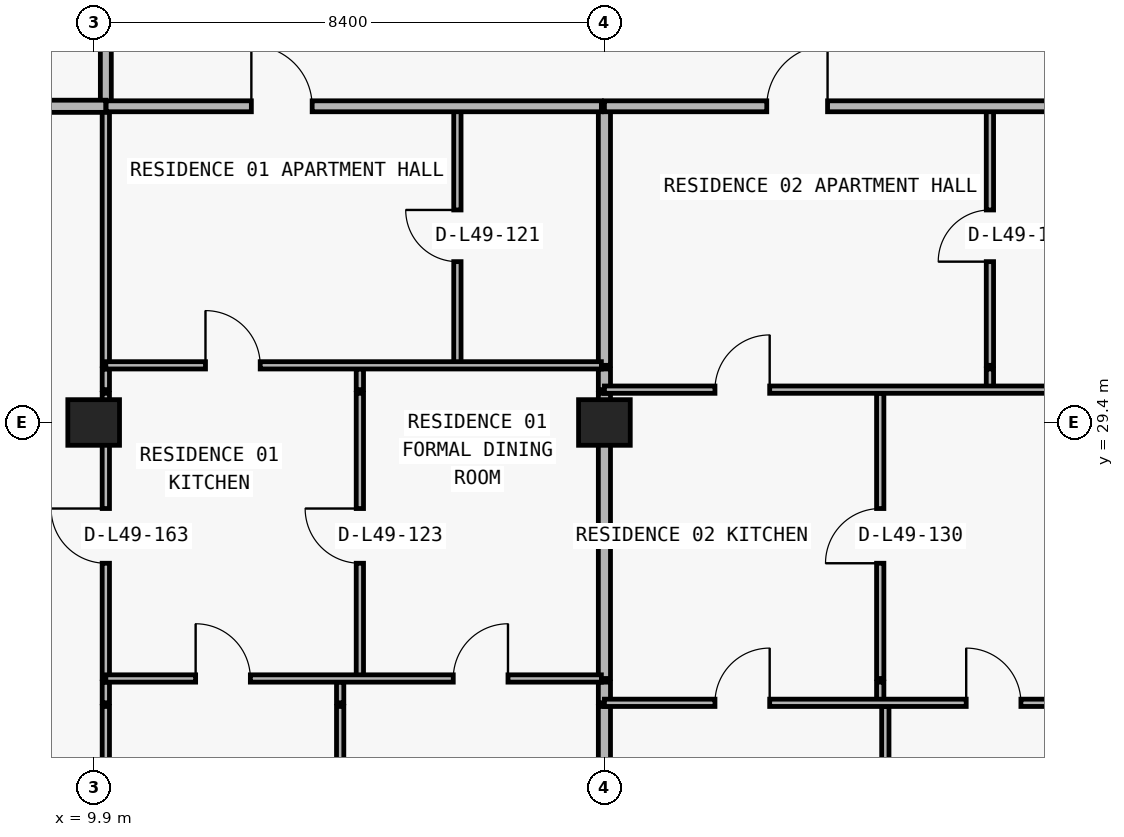
"""IFC4 building model, lengths in metres.
Left out: names, types, materials, properties, quantities, classifications, styles, units other than length and angle.
Written with IfcOpenShell. Run it as: python <this file> out.ifc"""

import sys

from ifc_helpers import new_model, si_unit, direction, frame, frame_2d, origin, origin_2d, place, context, subcontext, project, spatial, rectangle, extrude, element, fill, save


model = new_model("IFC4")
c1 = context("Model", 3, precision=1e-05, world=origin(), true_north=direction((0.0, 1.0)))
c2 = subcontext(c1, "Body", "Model", "MODEL_VIEW")
j1 = project(units=[si_unit("LENGTHUNIT", "METRE"), si_unit("PLANEANGLEUNIT", "RADIAN")], contexts=[c1])
p1 = place(None, origin())
s1 = spatial("IfcSite", under=j1, at=p1, CompositionType="ELEMENT")
p2 = place(p1, origin())
s2 = spatial("IfcBuilding", under=s1, at=p2, CompositionType="ELEMENT")
p3 = place(p2, frame((0.0, 0.0, 177.0)))
s3 = spatial("IfcBuildingStorey", under=s2, at=p3, CompositionType="ELEMENT", Elevation=177.0)
for number, where, z_axis, x_axis in (
    (1, (9.9, 29.4, 0.0), (0.0, 0.0, 1.0), (1.0, 0.0, 0.0)),
    (2, (18.3, 29.4, 0.0), (0.0, 0.0, 1.0), (1.0, 0.0, 0.0)),
):
    element("IfcColumn", number, at=place(p3, frame(where, z_axis=z_axis, x_axis=x_axis)), inside=s3, PredefinedType="COLUMN", context=c2, shape_type="SweptSolid", body=[
        extrude(rectangle(XDim=0.85, YDim=0.75, at=origin_2d()), origin(), (0.0, 0.0, 1.0), 3.05),
    ])
p4 = place(p3, frame((10.1, 11.285, 0.0), z_axis=(0.0, 0.0, 1.0), x_axis=(0.0, 1.0, 0.0)))
e3 = element("IfcWall", 3, at=p4, inside=s3, PredefinedType="PARTITIONING", context=c2, shape_type="SweptSolid", body=[
    extrude(rectangle(XDim=13.445, YDim=0.12, at=frame_2d((6.723, 0.0))), origin(), (0.0, 0.0, 1.0), 2.263),
])
p5 = place(p3, frame((10.1, 24.79, 0.0), z_axis=(0.0, 0.0, 1.0), x_axis=(0.0, 1.0, 0.0)))
e4 = element("IfcWall", 4, at=p5, inside=s3, PredefinedType="PARTITIONING", context=c2, shape_type="SweptSolid", body=[
    extrude(rectangle(XDim=0.34, YDim=0.12, at=frame_2d((0.17, 0.0))), origin(), (0.0, 0.0, 1.0), 2.263),
])
p6 = place(p3, frame((10.1, 25.19, 0.0), z_axis=(0.0, 0.0, 1.0), x_axis=(0.0, 1.0, 0.0)))
e5 = element("IfcWall", 5, at=p6, inside=s3, PredefinedType="PARTITIONING", context=c2, shape_type="SweptSolid", body=[
    extrude(rectangle(XDim=4.69, YDim=0.12, at=frame_2d((2.345, 0.0))), origin(), (0.0, 0.0, 1.0), 2.263),
])
p7 = place(p6, frame((1.895, 0.0, 0.0)))
e6 = element("IfcOpeningElement", 6, at=p7, cuts=e5, PredefinedType="OPENING", context=c2, shape_type="SweptSolid", body=[
    extrude(rectangle(XDim=0.9, YDim=2.15, at=frame_2d((0.45, 1.075))), frame((0.0, 0.07, 0.0), z_axis=(0.0, -1.0, 0.0), x_axis=(1.0, 0.0, 0.0)), (0.0, 0.0, 1.0), 0.14),
])
p8 = place(p3, frame((10.1, 29.94, 0.0), z_axis=(0.0, 0.0, 1.0), x_axis=(0.0, 1.0, 0.0)))
e7 = element("IfcWall", 7, at=p8, inside=s3, PredefinedType="PARTITIONING", context=c2, shape_type="SweptSolid", body=[
    extrude(rectangle(XDim=0.34, YDim=0.12, at=frame_2d((0.17, 0.0))), origin(), (0.0, 0.0, 1.0), 2.263),
])
p9 = place(p3, frame((10.1, 30.34, 0.0), z_axis=(0.0, 0.0, 1.0), x_axis=(0.0, 1.0, 0.0)))
e8 = element("IfcWall", 8, at=p9, inside=s3, PredefinedType="PARTITIONING", context=c2, shape_type="SweptSolid", body=[
    extrude(rectangle(XDim=4.26, YDim=0.12, at=frame_2d((2.13, 0.0))), origin(), (0.0, 0.0, 1.0), 2.263),
])
p10 = place(p3, frame((10.1, 34.605, 0.0), z_axis=(0.0, 0.0, 1.0), x_axis=(0.0, 1.0, 0.0)))
e9 = element("IfcWall", 9, at=p10, inside=s3, PredefinedType="PARTITIONING", context=c2, shape_type="SweptSolid", body=[
    extrude(rectangle(XDim=2.345, YDim=0.18, at=frame_2d((1.172, 0.0))), origin(), (0.0, 0.0, 1.0), 2.263),
])
p11 = place(p3, frame((13.954, 11.24, 0.0), z_axis=(0.0, 0.0, 1.0), x_axis=(0.0, 1.0, 0.0)))
e10 = element("IfcWall", 10, at=p11, inside=s3, PredefinedType="PARTITIONING", context=c2, shape_type="SweptSolid", body=[
    extrude(rectangle(XDim=13.49, YDim=0.12, at=frame_2d((6.745, 0.0))), origin(), (0.0, 0.0, 1.0), 2.499),
])
p12 = place(p3, frame((13.954, 24.79, 0.0), z_axis=(0.0, 0.0, 1.0), x_axis=(0.0, 1.0, 0.0)))
e11 = element("IfcWall", 11, at=p12, inside=s3, PredefinedType="PARTITIONING", context=c2, shape_type="SweptSolid", body=[
    extrude(rectangle(XDim=0.34, YDim=0.12, at=frame_2d((0.17, 0.0))), origin(), (0.0, 0.0, 1.0), 2.499),
])
p13 = place(p3, frame((14.278, 25.19, 0.0), z_axis=(0.0, 0.0, 1.0), x_axis=(0.0, 1.0, 0.0)))
e12 = element("IfcWall", 12, at=p13, inside=s3, PredefinedType="PARTITIONING", context=c2, shape_type="SweptSolid", body=[
    extrude(rectangle(XDim=4.69, YDim=0.12, at=frame_2d((2.345, 0.0))), origin(), (0.0, 0.0, 1.0), 2.499),
])
p14 = place(p13, frame((1.895, 0.0, 0.0)))
e13 = element("IfcOpeningElement", 13, at=p14, cuts=e12, PredefinedType="OPENING", context=c2, shape_type="SweptSolid", body=[
    extrude(rectangle(XDim=0.9, YDim=2.15, at=frame_2d((0.45, 1.075))), frame((0.0, 0.07, 0.0), z_axis=(0.0, -1.0, 0.0), x_axis=(1.0, 0.0, 0.0)), (0.0, 0.0, 1.0), 0.14),
])
p15 = place(p3, frame((14.278, 29.94, 0.0), z_axis=(0.0, 0.0, 1.0), x_axis=(0.0, 1.0, 0.0)))
e14 = element("IfcWall", 14, at=p15, inside=s3, PredefinedType="PARTITIONING", context=c2, shape_type="SweptSolid", body=[
    extrude(rectangle(XDim=0.34, YDim=0.12, at=frame_2d((0.17, 0.0))), origin(), (0.0, 0.0, 1.0), 2.499),
])
p16 = place(p3, frame((15.882, 30.34, 0.0), z_axis=(0.0, 0.0, 1.0), x_axis=(0.0, 1.0, 0.0)))
e15 = element("IfcWall", 15, at=p16, inside=s3, PredefinedType="PARTITIONING", context=c2, shape_type="SweptSolid", body=[
    extrude(rectangle(XDim=4.26, YDim=0.12, at=frame_2d((2.13, 0.0))), origin(), (0.0, 0.0, 1.0), 3.05),
])
p17 = place(p16, frame((1.705, 0.0, 0.0)))
e16 = element("IfcOpeningElement", 16, at=p17, cuts=e15, PredefinedType="OPENING", context=c2, shape_type="SweptSolid", body=[
    extrude(rectangle(XDim=0.85, YDim=2.1, at=frame_2d((0.425, 1.05))), frame((0.0, 0.07, 0.0), z_axis=(0.0, -1.0, 0.0), x_axis=(1.0, 0.0, 0.0)), (0.0, 0.0, 1.0), 0.14),
])
p18 = place(p3, frame((18.3, 11.24, 0.0), z_axis=(0.0, 0.0, 1.0), x_axis=(0.0, 1.0, 0.0)))
e17 = element("IfcWall", 17, at=p18, inside=s3, PredefinedType="PARTITIONING", context=c2, shape_type="SweptSolid", body=[
    extrude(rectangle(XDim=13.49, YDim=0.2, at=frame_2d((6.745, 0.0))), origin(), (0.0, 0.0, 1.0), 2.263),
])
p19 = place(p3, frame((18.3, 24.79, 0.0), z_axis=(0.0, 0.0, 1.0), x_axis=(0.0, 1.0, 0.0)))
e18 = element("IfcWall", 18, at=p19, inside=s3, PredefinedType="PARTITIONING", context=c2, shape_type="SweptSolid", body=[
    extrude(rectangle(XDim=0.34, YDim=0.2, at=frame_2d((0.17, 0.0))), origin(), (0.0, 0.0, 1.0), 2.263),
])
p20 = place(p3, frame((18.3, 25.19, 0.0), z_axis=(0.0, 0.0, 1.0), x_axis=(0.0, 1.0, 0.0)))
e19 = element("IfcWall", 19, at=p20, inside=s3, PredefinedType="PARTITIONING", context=c2, shape_type="SweptSolid", body=[
    extrude(rectangle(XDim=4.69, YDim=0.2, at=frame_2d((2.345, 0.0))), origin(), (0.0, 0.0, 1.0), 2.263),
])
p21 = place(p3, frame((18.3, 29.94, 0.0), z_axis=(0.0, 0.0, 1.0), x_axis=(0.0, 1.0, 0.0)))
e20 = element("IfcWall", 20, at=p21, inside=s3, PredefinedType="PARTITIONING", context=c2, shape_type="SweptSolid", body=[
    extrude(rectangle(XDim=0.34, YDim=0.2, at=frame_2d((0.17, 0.0))), origin(), (0.0, 0.0, 1.0), 2.263),
])
p22 = place(p3, frame((18.3, 30.34, 0.0), z_axis=(0.0, 0.0, 1.0), x_axis=(0.0, 1.0, 0.0)))
e21 = element("IfcWall", 21, at=p22, inside=s3, PredefinedType="PARTITIONING", context=c2, shape_type="SweptSolid", body=[
    extrude(rectangle(XDim=4.26, YDim=0.2, at=frame_2d((2.13, 0.0))), origin(), (0.0, 0.0, 1.0), 2.263),
])
p23 = place(p3, frame((22.836, 24.79, 0.0), z_axis=(0.0, 0.0, 1.0), x_axis=(0.0, 1.0, 0.0)))
e22 = element("IfcWall", 22, at=p23, inside=s3, PredefinedType="PARTITIONING", context=c2, shape_type="SweptSolid", body=[
    extrude(rectangle(XDim=0.34, YDim=0.12, at=frame_2d((0.17, 0.0))), origin(), (0.0, 0.0, 1.0), 3.05),
])
p24 = place(p3, frame((22.836, 25.19, 0.0), z_axis=(0.0, 0.0, 1.0), x_axis=(0.0, 1.0, 0.0)))
e23 = element("IfcWall", 23, at=p24, inside=s3, PredefinedType="PARTITIONING", context=c2, shape_type="SweptSolid", body=[
    extrude(rectangle(XDim=4.69, YDim=0.12, at=frame_2d((2.345, 0.0))), origin(), (0.0, 0.0, 1.0), 3.05),
])
p25 = place(p24, frame((1.895, 0.0, 0.0)))
e24 = element("IfcOpeningElement", 24, at=p25, cuts=e23, PredefinedType="OPENING", context=c2, shape_type="SweptSolid", body=[
    extrude(rectangle(XDim=0.9, YDim=2.15, at=frame_2d((0.45, 1.075))), frame((0.0, 0.07, 0.0), z_axis=(0.0, -1.0, 0.0), x_axis=(1.0, 0.0, 0.0)), (0.0, 0.0, 1.0), 0.14),
])
p26 = place(p3, frame((22.92, 11.24, 0.0), z_axis=(0.0, 0.0, 1.0), x_axis=(0.0, 1.0, 0.0)))
e25 = element("IfcWall", 25, at=p26, inside=s3, PredefinedType="PARTITIONING", context=c2, shape_type="SweptSolid", body=[
    extrude(rectangle(XDim=13.49, YDim=0.12, at=frame_2d((6.745, 0.0))), origin(), (0.0, 0.0, 1.0), 3.05),
])
p27 = place(p3, frame((24.64, 29.94, 0.0), z_axis=(0.0, 0.0, 1.0), x_axis=(0.0, 1.0, 0.0)))
e26 = element("IfcWall", 26, at=p27, inside=s3, PredefinedType="PARTITIONING", context=c2, shape_type="SweptSolid", body=[
    extrude(rectangle(XDim=0.34, YDim=0.12, at=frame_2d((0.17, 0.0))), origin(), (0.0, 0.0, 1.0), 3.05),
])
p28 = place(p3, frame((24.64, 30.34, 0.0), z_axis=(0.0, 0.0, 1.0), x_axis=(0.0, 1.0, 0.0)))
e27 = element("IfcWall", 27, at=p28, inside=s3, PredefinedType="PARTITIONING", context=c2, shape_type="SweptSolid", body=[
    extrude(rectangle(XDim=4.26, YDim=0.12, at=frame_2d((2.13, 0.0))), origin(), (0.0, 0.0, 1.0), 3.05),
])
p29 = place(p28, frame((1.705, 0.0, 0.0)))
e28 = element("IfcOpeningElement", 28, at=p29, cuts=e27, PredefinedType="OPENING", context=c2, shape_type="SweptSolid", body=[
    extrude(rectangle(XDim=0.85, YDim=2.1, at=frame_2d((0.425, 1.05))), frame((0.0, 0.07, 0.0), z_axis=(0.0, -1.0, 0.0), x_axis=(1.0, 0.0, 0.0)), (0.0, 0.0, 1.0), 0.14),
])
p30 = place(p3, frame((18.3, 24.79, 0.0), z_axis=(0.0, 0.0, 1.0), x_axis=(1.0, 0.0, 0.0)))
e29 = element("IfcWall", 29, at=p30, inside=s3, PredefinedType="PARTITIONING", context=c2, shape_type="SweptSolid", body=[
    extrude(rectangle(XDim=8.18, YDim=0.12, at=frame_2d((4.09, 0.0))), origin(), (0.0, 0.0, 1.0), 3.05),
])
p31 = place(p30, frame((1.818, 0.0, 0.0)))
e30 = element("IfcOpeningElement", 30, at=p31, cuts=e29, PredefinedType="OPENING", context=c2, shape_type="SweptSolid", body=[
    extrude(rectangle(XDim=0.9, YDim=2.15, at=frame_2d((0.45, 1.075))), frame((0.0, 0.07, 0.0), z_axis=(0.0, -1.0, 0.0), x_axis=(1.0, 0.0, 0.0)), (0.0, 0.0, 1.0), 0.14),
])
p32 = place(p30, frame((5.95, 0.0, 0.0)))
e31 = element("IfcOpeningElement", 31, at=p32, cuts=e29, PredefinedType="OPENING", context=c2, shape_type="SweptSolid", body=[
    extrude(rectangle(XDim=0.9, YDim=2.15, at=frame_2d((0.45, 1.075))), frame((0.0, 0.07, 0.0), z_axis=(0.0, -1.0, 0.0), x_axis=(1.0, 0.0, 0.0)), (0.0, 0.0, 1.0), 0.14),
])
p33 = place(p3, frame((10.1, 25.19, 0.0), z_axis=(0.0, 0.0, 1.0), x_axis=(1.0, 0.0, 0.0)))
e32 = element("IfcWall", 32, at=p33, inside=s3, PredefinedType="PARTITIONING", context=c2, shape_type="SweptSolid", body=[
    extrude(rectangle(XDim=8.15, YDim=0.12, at=frame_2d((4.075, 0.0))), origin(), (0.0, 0.0, 1.0), 3.05),
])
p34 = place(p33, frame((1.477, 0.0, 0.0)))
e33 = element("IfcOpeningElement", 33, at=p34, cuts=e32, PredefinedType="OPENING", context=c2, shape_type="SweptSolid", body=[
    extrude(rectangle(XDim=0.9, YDim=2.15, at=frame_2d((0.45, 1.075))), frame((0.0, 0.07, 0.0), z_axis=(0.0, -1.0, 0.0), x_axis=(1.0, 0.0, 0.0)), (0.0, 0.0, 1.0), 0.14),
])
p35 = place(p33, frame((5.714, 0.0, 0.0)))
e34 = element("IfcOpeningElement", 34, at=p35, cuts=e32, PredefinedType="OPENING", context=c2, shape_type="SweptSolid", body=[
    extrude(rectangle(XDim=0.9, YDim=2.15, at=frame_2d((0.45, 1.075))), frame((0.0, 0.07, 0.0), z_axis=(0.0, -1.0, 0.0), x_axis=(1.0, 0.0, 0.0)), (0.0, 0.0, 1.0), 0.14),
])
p36 = place(p3, frame((18.3, 29.94, 0.0), z_axis=(0.0, 0.0, 1.0), x_axis=(1.0, 0.0, 0.0)))
e35 = element("IfcWall", 35, at=p36, inside=s3, PredefinedType="PARTITIONING", context=c2, shape_type="SweptSolid", body=[
    extrude(rectangle(XDim=8.4, YDim=0.12, at=frame_2d((4.2, 0.0))), origin(), (0.0, 0.0, 1.0), 3.05),
])
p37 = place(p36, frame((1.818, 0.0, 0.0)))
e36 = element("IfcOpeningElement", 36, at=p37, cuts=e35, PredefinedType="OPENING", context=c2, shape_type="SweptSolid", body=[
    extrude(rectangle(XDim=0.9, YDim=2.15, at=frame_2d((0.45, 1.075))), frame((0.0, 0.07, 0.0), z_axis=(0.0, -1.0, 0.0), x_axis=(1.0, 0.0, 0.0)), (0.0, 0.0, 1.0), 0.14),
])
p38 = place(p3, frame((10.1, 30.34, 0.0), z_axis=(0.0, 0.0, 1.0), x_axis=(1.0, 0.0, 0.0)))
e37 = element("IfcWall", 37, at=p38, inside=s3, PredefinedType="PARTITIONING", context=c2, shape_type="SweptSolid", body=[
    extrude(rectangle(XDim=8.15, YDim=0.12, at=frame_2d((4.075, 0.0))), origin(), (0.0, 0.0, 1.0), 3.05),
])
p39 = place(p38, frame((1.639, 0.0, 0.0)))
e38 = element("IfcOpeningElement", 38, at=p39, cuts=e37, PredefinedType="OPENING", context=c2, shape_type="SweptSolid", body=[
    extrude(rectangle(XDim=0.9, YDim=2.15, at=frame_2d((0.45, 1.075))), frame((0.0, 0.07, 0.0), z_axis=(0.0, -1.0, 0.0), x_axis=(1.0, 0.0, 0.0)), (0.0, 0.0, 1.0), 0.14),
])
p40 = place(p3, frame((6.395, 34.6, 0.0), z_axis=(0.0, 0.0, 1.0), x_axis=(1.0, 0.0, 0.0)))
e39 = element("IfcWall", 39, at=p40, inside=s3, PredefinedType="PARTITIONING", context=c2, shape_type="SweptSolid", body=[
    extrude(rectangle(XDim=3.705, YDim=0.2, at=frame_2d((1.853, 0.0))), origin(), (0.0, 0.0, 1.0), 3.05),
])
p41 = place(p3, frame((10.105, 34.6, 0.0), z_axis=(0.0, 0.0, 1.0), x_axis=(1.0, 0.0, 0.0)))
e40 = element("IfcWall", 40, at=p41, inside=s3, PredefinedType="PARTITIONING", context=c2, shape_type="SweptSolid", body=[
    extrude(rectangle(XDim=8.145, YDim=0.18, at=frame_2d((4.073, 0.0))), origin(), (0.0, 0.0, 1.0), 3.05),
])
p42 = place(p41, frame((2.388, 0.0, 0.0)))
e41 = element("IfcOpeningElement", 41, at=p42, cuts=e40, PredefinedType="OPENING", context=c2, shape_type="SweptSolid", body=[
    extrude(rectangle(XDim=1.0, YDim=2.2, at=frame_2d((0.5, 1.1))), frame((0.0, 0.1, 0.0), z_axis=(0.0, -1.0, 0.0), x_axis=(1.0, 0.0, 0.0)), (0.0, 0.0, 1.0), 0.2),
])
p43 = place(p3, frame((18.3, 34.6, 0.0), z_axis=(0.0, 0.0, 1.0), x_axis=(1.0, 0.0, 0.0)))
e42 = element("IfcWall", 42, at=p43, inside=s3, PredefinedType="PARTITIONING", context=c2, shape_type="SweptSolid", body=[
    extrude(rectangle(XDim=41.2, YDim=0.18, at=frame_2d((20.6, 0.0))), origin(), (0.0, 0.0, 1.0), 3.05),
])
p44 = place(p43, frame((2.67, 0.0, 0.0)))
e43 = element("IfcOpeningElement", 43, at=p44, cuts=e42, PredefinedType="OPENING", context=c2, shape_type="SweptSolid", body=[
    extrude(rectangle(XDim=1.0, YDim=2.2, at=frame_2d((0.5, 1.1))), frame((0.0, 0.1, 0.0), z_axis=(0.0, -1.0, 0.0), x_axis=(1.0, 0.0, 0.0)), (0.0, 0.0, 1.0), 0.2),
])
p45 = place(p43, frame((11.212, 0.0, 0.0)))
e44 = element("IfcOpeningElement", 44, at=p45, cuts=e42, PredefinedType="OPENING", context=c2, shape_type="SweptSolid", body=[
    extrude(rectangle(XDim=1.0, YDim=2.2, at=frame_2d((0.5, 1.1))), frame((0.0, 0.1, 0.0), z_axis=(0.0, -1.0, 0.0), x_axis=(1.0, 0.0, 0.0)), (0.0, 0.0, 1.0), 0.2),
])
p46 = place(p43, frame((35.483, 0.0, 0.0)))
e45 = element("IfcOpeningElement", 45, at=p46, cuts=e42, PredefinedType="OPENING", context=c2, shape_type="SweptSolid", body=[
    extrude(rectangle(XDim=1.0, YDim=2.2, at=frame_2d((0.5, 1.1))), frame((0.0, 0.1, 0.0), z_axis=(0.0, -1.0, 0.0), x_axis=(1.0, 0.0, 0.0)), (0.0, 0.0, 1.0), 0.2),
])
p47 = place(p42, origin())
e46 = element("IfcDoor", 46, at=p47, inside=s3, OperationType="SINGLE_SWING_LEFT", PredefinedType="DOOR", context=c2, shape_type="SweptSolid", body=[
    extrude(rectangle(XDim=1.0, YDim=2.2, at=frame_2d((0.5, 1.1))), frame((0.0, 0.025, 0.0), z_axis=(0.0, -1.0, 0.0), x_axis=(1.0, 0.0, 0.0)), (0.0, 0.0, 1.0), 0.05),
])
fill(e41, e46)
p48 = place(p17, origin())
e47 = element("IfcDoor", 47, at=p48, inside=s3, OperationType="SINGLE_SWING_RIGHT", PredefinedType="DOOR", context=c2, shape_type="SweptSolid", body=[
    extrude(rectangle(XDim=0.85, YDim=2.1, at=frame_2d((0.425, 1.05))), frame((0.0, 0.025, 0.0), z_axis=(0.0, -1.0, 0.0), x_axis=(1.0, 0.0, 0.0)), (0.0, 0.0, 1.0), 0.05),
])
fill(e16, e47)
p49 = place(p39, origin())
e48 = element("IfcDoor", 48, at=p49, inside=s3, OperationType="SINGLE_SWING_LEFT", PredefinedType="DOOR", context=c2, shape_type="SweptSolid", body=[
    extrude(rectangle(XDim=0.9, YDim=2.15, at=frame_2d((0.45, 1.075))), frame((0.0, 0.025, 0.0), z_axis=(0.0, -1.0, 0.0), x_axis=(1.0, 0.0, 0.0)), (0.0, 0.0, 1.0), 0.05),
])
fill(e38, e48)
p50 = place(p14, origin())
e49 = element("IfcDoor", 49, at=p50, inside=s3, OperationType="SINGLE_SWING_RIGHT", PredefinedType="DOOR", context=c2, shape_type="SweptSolid", body=[
    extrude(rectangle(XDim=0.9, YDim=2.15, at=frame_2d((0.45, 1.075))), frame((0.0, 0.025, 0.0), z_axis=(0.0, -1.0, 0.0), x_axis=(1.0, 0.0, 0.0)), (0.0, 0.0, 1.0), 0.05),
])
fill(e13, e49)
p51 = place(p34, origin())
e50 = element("IfcDoor", 50, at=p51, inside=s3, OperationType="SINGLE_SWING_LEFT", PredefinedType="DOOR", context=c2, shape_type="SweptSolid", body=[
    extrude(rectangle(XDim=0.9, YDim=2.15, at=frame_2d((0.45, 1.075))), frame((0.0, 0.025, 0.0), z_axis=(0.0, -1.0, 0.0), x_axis=(1.0, 0.0, 0.0)), (0.0, 0.0, 1.0), 0.05),
])
fill(e33, e50)
p52 = place(p35, origin())
e51 = element("IfcDoor", 51, at=p52, inside=s3, OperationType="SINGLE_SWING_RIGHT", PredefinedType="DOOR", context=c2, shape_type="SweptSolid", body=[
    extrude(rectangle(XDim=0.9, YDim=2.15, at=frame_2d((0.45, 1.075))), frame((0.0, 0.025, 0.0), z_axis=(0.0, -1.0, 0.0), x_axis=(1.0, 0.0, 0.0)), (0.0, 0.0, 1.0), 0.05),
])
fill(e34, e51)
p53 = place(p44, origin())
e52 = element("IfcDoor", 52, at=p53, inside=s3, OperationType="SINGLE_SWING_RIGHT", PredefinedType="DOOR", context=c2, shape_type="SweptSolid", body=[
    extrude(rectangle(XDim=1.0, YDim=2.2, at=frame_2d((0.5, 1.1))), frame((0.0, 0.025, 0.0), z_axis=(0.0, -1.0, 0.0), x_axis=(1.0, 0.0, 0.0)), (0.0, 0.0, 1.0), 0.05),
])
fill(e43, e52)
p54 = place(p29, origin())
e53 = element("IfcDoor", 53, at=p54, inside=s3, OperationType="SINGLE_SWING_LEFT", PredefinedType="DOOR", context=c2, shape_type="SweptSolid", body=[
    extrude(rectangle(XDim=0.85, YDim=2.1, at=frame_2d((0.425, 1.05))), frame((0.0, 0.025, 0.0), z_axis=(0.0, -1.0, 0.0), x_axis=(1.0, 0.0, 0.0)), (0.0, 0.0, 1.0), 0.05),
])
fill(e28, e53)
p55 = place(p37, origin())
e54 = element("IfcDoor", 54, at=p55, inside=s3, OperationType="SINGLE_SWING_RIGHT", PredefinedType="DOOR", context=c2, shape_type="SweptSolid", body=[
    extrude(rectangle(XDim=0.9, YDim=2.15, at=frame_2d((0.45, 1.075))), frame((0.0, 0.025, 0.0), z_axis=(0.0, -1.0, 0.0), x_axis=(1.0, 0.0, 0.0)), (0.0, 0.0, 1.0), 0.05),
])
fill(e36, e54)
p56 = place(p25, origin())
e55 = element("IfcDoor", 55, at=p56, inside=s3, OperationType="SINGLE_SWING_LEFT", PredefinedType="DOOR", context=c2, shape_type="SweptSolid", body=[
    extrude(rectangle(XDim=0.9, YDim=2.15, at=frame_2d((0.45, 1.075))), frame((0.0, 0.025, 0.0), z_axis=(0.0, -1.0, 0.0), x_axis=(1.0, 0.0, 0.0)), (0.0, 0.0, 1.0), 0.05),
])
fill(e24, e55)
p57 = place(p31, origin())
e56 = element("IfcDoor", 56, at=p57, inside=s3, OperationType="SINGLE_SWING_RIGHT", PredefinedType="DOOR", context=c2, shape_type="SweptSolid", body=[
    extrude(rectangle(XDim=0.9, YDim=2.15, at=frame_2d((0.45, 1.075))), frame((0.0, 0.025, 0.0), z_axis=(0.0, -1.0, 0.0), x_axis=(1.0, 0.0, 0.0)), (0.0, 0.0, 1.0), 0.05),
])
fill(e30, e56)
p58 = place(p32, origin())
e57 = element("IfcDoor", 57, at=p58, inside=s3, OperationType="SINGLE_SWING_LEFT", PredefinedType="DOOR", context=c2, shape_type="SweptSolid", body=[
    extrude(rectangle(XDim=0.9, YDim=2.15, at=frame_2d((0.45, 1.075))), frame((0.0, 0.025, 0.0), z_axis=(0.0, -1.0, 0.0), x_axis=(1.0, 0.0, 0.0)), (0.0, 0.0, 1.0), 0.05),
])
fill(e31, e57)
p59 = place(p7, origin())
e58 = element("IfcDoor", 58, at=p59, inside=s3, OperationType="SINGLE_SWING_RIGHT", PredefinedType="DOOR", context=c2, shape_type="SweptSolid", body=[
    extrude(rectangle(XDim=0.9, YDim=2.15, at=frame_2d((0.45, 1.075))), frame((0.0, 0.025, 0.0), z_axis=(0.0, -1.0, 0.0), x_axis=(1.0, 0.0, 0.0)), (0.0, 0.0, 1.0), 0.05),
])
fill(e6, e58)
save(model, sys.argv[1])
